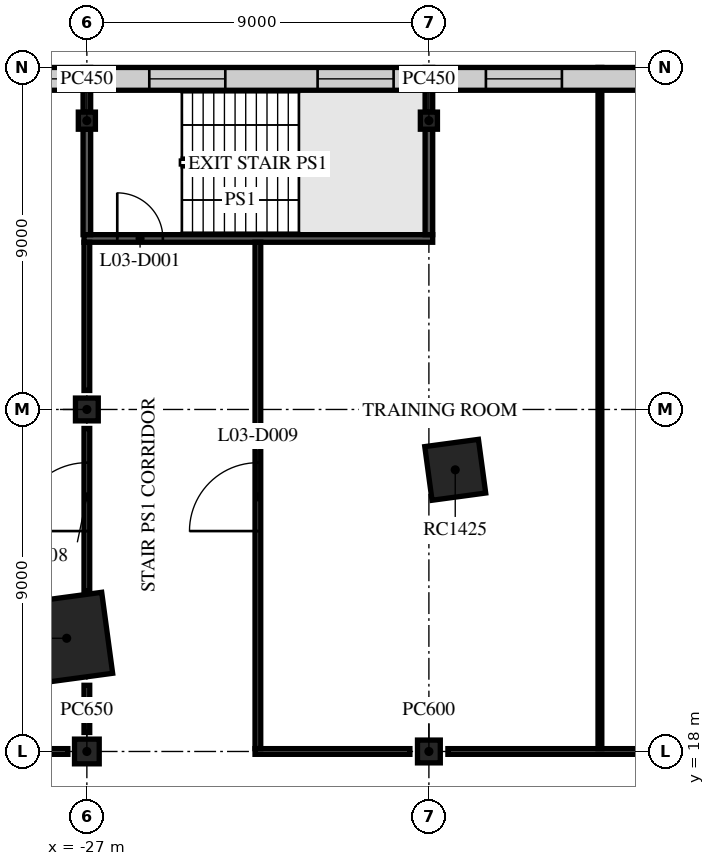
"""IFC4 building model, lengths in metres.
Left out: names, types, materials, properties, quantities, classifications, styles, units other than length and angle.
Written with IfcOpenShell. Run it as: python <this file> out.ifc"""

import sys

from ifc_helpers import new_model, si_unit, direction, frame, frame_2d, origin, origin_2d, place, context, subcontext, project, spatial, rectangle, extrude, element, fill, save


model = new_model("IFC4")
c1 = context("Model", 3, precision=1e-05, world=origin(), true_north=direction((0.0, 1.0)))
c2 = subcontext(c1, "Body", "Model", "MODEL_VIEW")
j1 = project(units=[si_unit("LENGTHUNIT", "METRE"), si_unit("PLANEANGLEUNIT", "RADIAN")], contexts=[c1])
p1 = place(None, origin())
s1 = spatial("IfcSite", under=j1, at=p1, CompositionType="ELEMENT")
p2 = place(p1, origin())
s2 = spatial("IfcBuilding", under=s1, at=p2, CompositionType="ELEMENT")
p3 = place(p2, frame((0.0, 0.0, 13.5)))
s3 = spatial("IfcBuildingStorey", under=s2, at=p3, CompositionType="ELEMENT", Elevation=13.5)
p4 = place(p3, frame((-27.0, 18.0, 0.0), z_axis=(0.0, 0.0, 1.0), x_axis=(1.0, 0.0, 0.0)))
e1 = element("IfcColumn", 1, at=p4, inside=s3, PredefinedType="COLUMN", context=c2, shape_type="SweptSolid", body=[
    extrude(rectangle(XDim=0.65, YDim=0.65, at=origin_2d()), origin(), (0.0, 0.0, 1.0), 4.5),
])
p5 = place(p3, frame((-27.0, 27.0, 0.0), z_axis=(0.0, 0.0, 1.0), x_axis=(1.0, 0.0, 0.0)))
e2 = element("IfcColumn", 2, at=p5, inside=s3, PredefinedType="COLUMN", context=c2, shape_type="SweptSolid", body=[
    extrude(rectangle(XDim=0.6, YDim=0.6, at=origin_2d()), origin(), (0.0, 0.0, 1.0), 4.5),
])
p6 = place(p3, frame((-27.0, 34.6, 0.0), z_axis=(0.0, 0.0, 1.0), x_axis=(1.0, 0.0, 0.0)))
e3 = element("IfcColumn", 3, at=p6, inside=s3, PredefinedType="COLUMN", context=c2, shape_type="SweptSolid", body=[
    extrude(rectangle(XDim=0.45, YDim=0.45, at=origin_2d()), origin(), (0.0, 0.0, 1.0), 4.5),
])
p7 = place(p3, frame((-18.0, 18.0, 0.0), z_axis=(0.0, 0.0, 1.0), x_axis=(1.0, 0.0, 0.0)))
e4 = element("IfcColumn", 4, at=p7, inside=s3, PredefinedType="COLUMN", context=c2, shape_type="SweptSolid", body=[
    extrude(rectangle(XDim=0.6, YDim=0.6, at=origin_2d()), origin(), (0.0, 0.0, 1.0), 4.5),
])
p8 = place(p3, frame((-18.0, 34.6, 0.0), z_axis=(0.0, 0.0, 1.0), x_axis=(1.0, 0.0, 0.0)))
e5 = element("IfcColumn", 5, at=p8, inside=s3, PredefinedType="COLUMN", context=c2, shape_type="SweptSolid", body=[
    extrude(rectangle(XDim=0.45, YDim=0.45, at=origin_2d()), origin(), (0.0, 0.0, 1.0), 4.5),
])
p9 = place(p3, frame((-17.307, 25.412, 0.0), z_axis=(0.0, 0.0, 1.0), x_axis=(0.991001197216, 0.133853005627, 0.0)))
e6 = element("IfcColumn", 6, at=p9, inside=s3, PredefinedType="COLUMN", context=c2, shape_type="SweptSolid", body=[
    extrude(rectangle(XDim=1.425, YDim=1.425, at=origin_2d()), origin(), (0.0, 0.0, 1.0), 4.5),
])
p10 = place(p3, frame((-27.531, 20.979, 0.0), z_axis=(0.0, 0.0, 1.0), x_axis=(0.991001197216, 0.133853005627, 0.0)))
e7 = element("IfcColumn", 7, at=p10, inside=s3, PredefinedType="COLUMN", context=c2, shape_type="SweptSolid", body=[
    extrude(rectangle(XDim=2.15, YDim=2.15, at=origin_2d()), origin(), (0.0, 0.0, 1.0), 4.5),
])
p11 = place(p3, frame((-34.1, 18.0, 0.0), z_axis=(0.0, 0.0, 1.0), x_axis=(1.0, 0.0, 0.0)))
e8 = element("IfcWall", 8, at=p11, inside=s3, PredefinedType="PARTITIONING", context=c2, shape_type="SweptSolid", body=[
    extrude(rectangle(XDim=6.6, YDim=0.15, at=frame_2d((3.3, 0.0))), origin(), (0.0, 0.0, 1.0), 4.1),
])
p12 = place(p3, frame((-22.575, 18.0, 0.0), z_axis=(0.0, 0.0, 1.0), x_axis=(1.0, 0.0, 0.0)))
e9 = element("IfcWall", 9, at=p12, inside=s3, PredefinedType="PARTITIONING", context=c2, shape_type="SweptSolid", body=[
    extrude(rectangle(XDim=4.075, YDim=0.15, at=frame_2d((2.038, 0.0))), origin(), (0.0, 0.0, 1.0), 4.1),
])
p13 = place(p3, frame((-17.5, 18.0, 0.0), z_axis=(0.0, 0.0, 1.0), x_axis=(1.0, 0.0, 0.0)))
e10 = element("IfcWall", 10, at=p13, inside=s3, PredefinedType="PARTITIONING", context=c2, shape_type="SweptSolid", body=[
    extrude(rectangle(XDim=8.0, YDim=0.15, at=frame_2d((4.0, 0.0))), origin(), (0.0, 0.0, 1.0), 4.1),
])
p14 = place(p3, frame((-27.075, 31.5, 0.0), z_axis=(0.0, 0.0, 1.0), x_axis=(1.0, 0.0, 0.0)))
e11 = element("IfcWall", 11, at=p14, inside=s3, PredefinedType="PARTITIONING", context=c2, shape_type="SweptSolid", body=[
    extrude(rectangle(XDim=9.175, YDim=0.2, at=frame_2d((4.587, 0.0))), origin(), (0.0, 0.0, 1.0), 4.1),
])
p15 = place(p14, frame((0.875, 0.0, 0.0)))
e12 = element("IfcOpeningElement", 12, at=p15, cuts=e11, PredefinedType="OPENING", context=c2, shape_type="SweptSolid", body=[
    extrude(rectangle(XDim=1.2, YDim=2.1, at=frame_2d((0.6, 1.05))), frame((0.0, 0.11, 0.0), z_axis=(0.0, -1.0, 0.0), x_axis=(1.0, 0.0, 0.0)), (0.0, 0.0, 1.0), 0.22),
])
p16 = place(p3, frame((-27.0, 18.5, 0.0), z_axis=(0.0, 0.0, 1.0), x_axis=(0.0, 1.0, 0.0)))
e13 = element("IfcWall", 13, at=p16, inside=s3, PredefinedType="PARTITIONING", context=c2, shape_type="SweptSolid", body=[
    extrude(rectangle(XDim=1.242, YDim=0.15, at=frame_2d((0.621, 0.0))), origin(), (0.0, 0.0, 1.0), 4.1),
])
p17 = place(p3, frame((-27.0, 22.216, 0.0), z_axis=(0.0, 0.0, 1.0), x_axis=(0.0, 1.0, 0.0)))
e14 = element("IfcWall", 14, at=p17, inside=s3, PredefinedType="PARTITIONING", context=c2, shape_type="SweptSolid", body=[
    extrude(rectangle(XDim=4.284, YDim=0.15, at=frame_2d((2.142, 0.0))), origin(), (0.0, 0.0, 1.0), 4.1),
])
p18 = place(p17, frame((1.584, 0.0, 0.0)))
e15 = element("IfcOpeningElement", 15, at=p18, cuts=e14, PredefinedType="OPENING", context=c2, shape_type="SweptSolid", body=[
    extrude(rectangle(XDim=1.8, YDim=2.1, at=frame_2d((0.9, 1.05))), frame((0.0, 0.085, 0.0), z_axis=(0.0, -1.0, 0.0), x_axis=(1.0, 0.0, 0.0)), (0.0, 0.0, 1.0), 0.17),
])
p19 = place(p3, frame((-27.0, 27.5, 0.0), z_axis=(0.0, 0.0, 1.0), x_axis=(0.0, 1.0, 0.0)))
e16 = element("IfcWall", 16, at=p19, inside=s3, PredefinedType="PARTITIONING", context=c2, shape_type="SweptSolid", body=[
    extrude(rectangle(XDim=3.9, YDim=0.15, at=frame_2d((1.95, 0.0))), origin(), (0.0, 0.0, 1.0), 4.1),
])
p20 = place(p3, frame((-27.0, 31.6, 0.0), z_axis=(0.0, 0.0, 1.0), x_axis=(0.0, 1.0, 0.0)))
e17 = element("IfcWall", 17, at=p20, inside=s3, PredefinedType="PARTITIONING", context=c2, shape_type="SweptSolid", body=[
    extrude(rectangle(XDim=2.775, YDim=0.2, at=frame_2d((1.387, 0.0))), origin(), (0.0, 0.0, 1.0), 4.1),
])
p21 = place(p3, frame((-27.0, 34.825, 0.0), z_axis=(0.0, 0.0, 1.0), x_axis=(0.0, 1.0, 0.0)))
e18 = element("IfcWall", 18, at=p21, inside=s3, PredefinedType="PARTITIONING", context=c2, shape_type="SweptSolid", body=[
    extrude(rectangle(XDim=1.175, YDim=0.2, at=frame_2d((0.587, 0.0))), origin(), (0.0, 0.0, 1.0), 4.1),
])
p22 = place(p3, frame((-22.5, 18.075, 0.0), z_axis=(0.0, 0.0, 1.0), x_axis=(0.0, 1.0, 0.0)))
e19 = element("IfcWall", 19, at=p22, inside=s3, PredefinedType="PARTITIONING", context=c2, shape_type="SweptSolid", body=[
    extrude(rectangle(XDim=13.325, YDim=0.15, at=frame_2d((6.663, 0.0))), origin(), (0.0, 0.0, 1.0), 4.1),
])
p23 = place(p22, frame((5.725, 0.0, 0.0)))
e20 = element("IfcOpeningElement", 20, at=p23, cuts=e19, PredefinedType="OPENING", context=c2, shape_type="SweptSolid", body=[
    extrude(rectangle(XDim=1.8, YDim=2.1, at=frame_2d((0.9, 1.05))), frame((0.0, 0.085, 0.0), z_axis=(0.0, -1.0, 0.0), x_axis=(1.0, 0.0, 0.0)), (0.0, 0.0, 1.0), 0.17),
])
p24 = place(p3, frame((-18.0, 31.6, 0.0), z_axis=(0.0, 0.0, 1.0), x_axis=(0.0, 1.0, 0.0)))
e21 = element("IfcWall", 21, at=p24, inside=s3, PredefinedType="PARTITIONING", context=c2, shape_type="SweptSolid", body=[
    extrude(rectangle(XDim=2.775, YDim=0.2, at=frame_2d((1.387, 0.0))), origin(), (0.0, 0.0, 1.0), 4.1),
])
p25 = place(p3, frame((-18.0, 34.825, 0.0), z_axis=(0.0, 0.0, 1.0), x_axis=(0.0, 1.0, 0.0)))
e22 = element("IfcWall", 22, at=p25, inside=s3, PredefinedType="PARTITIONING", context=c2, shape_type="SweptSolid", body=[
    extrude(rectangle(XDim=1.175, YDim=0.2, at=frame_2d((0.587, 0.0))), origin(), (0.0, 0.0, 1.0), 4.1),
])
p26 = place(p3, frame((-13.5, 18.075, 0.0), z_axis=(0.0, 0.0, 1.0), x_axis=(0.0, 1.0, 0.0)))
e23 = element("IfcWall", 23, at=p26, inside=s3, PredefinedType="PARTITIONING", context=c2, shape_type="SweptSolid", body=[
    extrude(rectangle(XDim=17.925, YDim=0.1, at=frame_2d((8.962, 0.0))), origin(), (0.0, 0.0, 1.0), 4.1),
])
p27 = place(p3, frame((30.876, 35.7, 0.0), z_axis=(0.0, 0.0, 1.0), x_axis=(-1.0, 0.0, 0.0)))
e24 = element("IfcWall", 24, at=p27, inside=s3, PredefinedType="STANDARD", context=c2, shape_type="SweptSolid", body=[
    extrude(rectangle(XDim=61.751, YDim=0.6, at=frame_2d((30.876, 0.0))), origin(), (0.0, 0.0, 1.0), 4.1),
])
p28 = place(p27, frame((1.152, 0.0, 0.9)))
e25 = element("IfcOpeningElement", 25, at=p28, cuts=e24, PredefinedType="OPENING", context=c2, shape_type="SweptSolid", body=[
    extrude(rectangle(XDim=2.0, YDim=3.0, at=frame_2d((1.0, 1.5))), frame((0.0, 0.31, 0.0), z_axis=(0.0, -1.0, 0.0), x_axis=(1.0, 0.0, 0.0)), (0.0, 0.0, 1.0), 0.62),
])
p29 = place(p27, frame((5.519, 0.0, 0.9)))
e26 = element("IfcOpeningElement", 26, at=p29, cuts=e24, PredefinedType="OPENING", context=c2, shape_type="SweptSolid", body=[
    extrude(rectangle(XDim=2.0, YDim=3.0, at=frame_2d((1.0, 1.5))), frame((0.0, 0.31, 0.0), z_axis=(0.0, -1.0, 0.0), x_axis=(1.0, 0.0, 0.0)), (0.0, 0.0, 1.0), 0.62),
])
p30 = place(p27, frame((9.947, 0.0, 0.9)))
e27 = element("IfcOpeningElement", 27, at=p30, cuts=e24, PredefinedType="OPENING", context=c2, shape_type="SweptSolid", body=[
    extrude(rectangle(XDim=2.0, YDim=3.0, at=frame_2d((1.0, 1.5))), frame((0.0, 0.31, 0.0), z_axis=(0.0, -1.0, 0.0), x_axis=(1.0, 0.0, 0.0)), (0.0, 0.0, 1.0), 0.62),
])
p31 = place(p27, frame((14.376, 0.0, 0.9)))
e28 = element("IfcOpeningElement", 28, at=p31, cuts=e24, PredefinedType="OPENING", context=c2, shape_type="SweptSolid", body=[
    extrude(rectangle(XDim=2.0, YDim=3.0, at=frame_2d((1.0, 1.5))), frame((0.0, 0.31, 0.0), z_axis=(0.0, -1.0, 0.0), x_axis=(1.0, 0.0, 0.0)), (0.0, 0.0, 1.0), 0.62),
])
p32 = place(p27, frame((18.804, 0.0, 0.9)))
e29 = element("IfcOpeningElement", 29, at=p32, cuts=e24, PredefinedType="OPENING", context=c2, shape_type="SweptSolid", body=[
    extrude(rectangle(XDim=2.0, YDim=3.0, at=frame_2d((1.0, 1.5))), frame((0.0, 0.31, 0.0), z_axis=(0.0, -1.0, 0.0), x_axis=(1.0, 0.0, 0.0)), (0.0, 0.0, 1.0), 0.62),
])
p33 = place(p27, frame((23.233, 0.0, 0.9)))
e30 = element("IfcOpeningElement", 30, at=p33, cuts=e24, PredefinedType="OPENING", context=c2, shape_type="SweptSolid", body=[
    extrude(rectangle(XDim=2.0, YDim=3.0, at=frame_2d((1.0, 1.5))), frame((0.0, 0.31, 0.0), z_axis=(0.0, -1.0, 0.0), x_axis=(1.0, 0.0, 0.0)), (0.0, 0.0, 1.0), 0.62),
])
p34 = place(p27, frame((27.662, 0.0, 0.9)))
e31 = element("IfcOpeningElement", 31, at=p34, cuts=e24, PredefinedType="OPENING", context=c2, shape_type="SweptSolid", body=[
    extrude(rectangle(XDim=2.0, YDim=3.0, at=frame_2d((1.0, 1.5))), frame((0.0, 0.31, 0.0), z_axis=(0.0, -1.0, 0.0), x_axis=(1.0, 0.0, 0.0)), (0.0, 0.0, 1.0), 0.62),
])
p35 = place(p27, frame((32.09, 0.0, 0.9)))
e32 = element("IfcOpeningElement", 32, at=p35, cuts=e24, PredefinedType="OPENING", context=c2, shape_type="SweptSolid", body=[
    extrude(rectangle(XDim=2.0, YDim=3.0, at=frame_2d((1.0, 1.5))), frame((0.0, 0.31, 0.0), z_axis=(0.0, -1.0, 0.0), x_axis=(1.0, 0.0, 0.0)), (0.0, 0.0, 1.0), 0.62),
])
p36 = place(p27, frame((36.519, 0.0, 0.9)))
e33 = element("IfcOpeningElement", 33, at=p36, cuts=e24, PredefinedType="OPENING", context=c2, shape_type="SweptSolid", body=[
    extrude(rectangle(XDim=2.0, YDim=3.0, at=frame_2d((1.0, 1.5))), frame((0.0, 0.31, 0.0), z_axis=(0.0, -1.0, 0.0), x_axis=(1.0, 0.0, 0.0)), (0.0, 0.0, 1.0), 0.62),
])
p37 = place(p27, frame((40.947, 0.0, 0.9)))
e34 = element("IfcOpeningElement", 34, at=p37, cuts=e24, PredefinedType="OPENING", context=c2, shape_type="SweptSolid", body=[
    extrude(rectangle(XDim=2.0, YDim=3.0, at=frame_2d((1.0, 1.5))), frame((0.0, 0.31, 0.0), z_axis=(0.0, -1.0, 0.0), x_axis=(1.0, 0.0, 0.0)), (0.0, 0.0, 1.0), 0.62),
])
p38 = place(p27, frame((45.376, 0.0, 0.9)))
e35 = element("IfcOpeningElement", 35, at=p38, cuts=e24, PredefinedType="OPENING", context=c2, shape_type="SweptSolid", body=[
    extrude(rectangle(XDim=2.0, YDim=3.0, at=frame_2d((1.0, 1.5))), frame((0.0, 0.31, 0.0), z_axis=(0.0, -1.0, 0.0), x_axis=(1.0, 0.0, 0.0)), (0.0, 0.0, 1.0), 0.62),
])
p39 = place(p27, frame((49.804, 0.0, 0.9)))
e36 = element("IfcOpeningElement", 36, at=p39, cuts=e24, PredefinedType="OPENING", context=c2, shape_type="SweptSolid", body=[
    extrude(rectangle(XDim=2.0, YDim=3.0, at=frame_2d((1.0, 1.5))), frame((0.0, 0.31, 0.0), z_axis=(0.0, -1.0, 0.0), x_axis=(1.0, 0.0, 0.0)), (0.0, 0.0, 1.0), 0.62),
])
p40 = place(p27, frame((54.233, 0.0, 0.9)))
e37 = element("IfcOpeningElement", 37, at=p40, cuts=e24, PredefinedType="OPENING", context=c2, shape_type="SweptSolid", body=[
    extrude(rectangle(XDim=2.0, YDim=3.0, at=frame_2d((1.0, 1.5))), frame((0.0, 0.31, 0.0), z_axis=(0.0, -1.0, 0.0), x_axis=(1.0, 0.0, 0.0)), (0.0, 0.0, 1.0), 0.62),
])
p41 = place(p27, frame((58.599, 0.0, 0.9)))
e38 = element("IfcOpeningElement", 38, at=p41, cuts=e24, PredefinedType="OPENING", context=c2, shape_type="SweptSolid", body=[
    extrude(rectangle(XDim=2.0, YDim=3.0, at=frame_2d((1.0, 1.5))), frame((0.0, 0.31, 0.0), z_axis=(0.0, -1.0, 0.0), x_axis=(1.0, 0.0, 0.0)), (0.0, 0.0, 1.0), 0.62),
])
p42 = place(p15, origin())
e39 = element("IfcDoor", 39, at=p42, inside=s3, OperationType="SINGLE_SWING_LEFT", PredefinedType="DOOR", context=c2, shape_type="SweptSolid", body=[
    extrude(rectangle(XDim=1.2, YDim=2.1, at=frame_2d((0.6, 1.05))), frame((0.0, 0.025, 0.0), z_axis=(0.0, -1.0, 0.0), x_axis=(1.0, 0.0, 0.0)), (0.0, 0.0, 1.0), 0.05),
])
fill(e12, e39)
p43 = place(p18, origin())
e40 = element("IfcDoor", 40, at=p43, inside=s3, OperationType="DOUBLE_DOOR_SINGLE_SWING", PredefinedType="DOOR", context=c2, shape_type="SweptSolid", body=[
    extrude(rectangle(XDim=1.8, YDim=2.1, at=frame_2d((0.9, 1.05))), frame((0.0, 0.025, 0.0), z_axis=(0.0, -1.0, 0.0), x_axis=(1.0, 0.0, 0.0)), (0.0, 0.0, 1.0), 0.05),
])
fill(e15, e40)
p44 = place(p23, origin())
e41 = element("IfcDoor", 41, at=p44, inside=s3, OperationType="DOUBLE_DOOR_SINGLE_SWING", PredefinedType="DOOR", context=c2, shape_type="SweptSolid", body=[
    extrude(rectangle(XDim=1.8, YDim=2.1, at=frame_2d((0.9, 1.05))), frame((0.0, 0.025, 0.0), z_axis=(0.0, -1.0, 0.0), x_axis=(1.0, 0.0, 0.0)), (0.0, 0.0, 1.0), 0.05),
])
fill(e20, e41)
p45 = place(p38, origin())
e42 = element("IfcWindow", 42, at=p45, inside=s3, PartitioningType="SINGLE_PANEL", PredefinedType="WINDOW", context=c2, shape_type="SweptSolid", body=[
    extrude(rectangle(XDim=2.0, YDim=3.0, at=frame_2d((1.0, 1.5))), frame((0.0, 0.03, 0.0), z_axis=(0.0, -1.0, 0.0), x_axis=(1.0, 0.0, 0.0)), (0.0, 0.0, 1.0), 0.06),
])
fill(e35, e42)
p46 = place(p39, origin())
e43 = element("IfcWindow", 43, at=p46, inside=s3, PartitioningType="SINGLE_PANEL", PredefinedType="WINDOW", context=c2, shape_type="SweptSolid", body=[
    extrude(rectangle(XDim=2.0, YDim=3.0, at=frame_2d((1.0, 1.5))), frame((0.0, 0.03, 0.0), z_axis=(0.0, -1.0, 0.0), x_axis=(1.0, 0.0, 0.0)), (0.0, 0.0, 1.0), 0.06),
])
fill(e36, e43)
p47 = place(p40, origin())
e44 = element("IfcWindow", 44, at=p47, inside=s3, PartitioningType="SINGLE_PANEL", PredefinedType="WINDOW", context=c2, shape_type="SweptSolid", body=[
    extrude(rectangle(XDim=2.0, YDim=3.0, at=frame_2d((1.0, 1.5))), frame((0.0, 0.03, 0.0), z_axis=(0.0, -1.0, 0.0), x_axis=(1.0, 0.0, 0.0)), (0.0, 0.0, 1.0), 0.06),
])
fill(e37, e44)
p48 = place(p41, origin())
e45 = element("IfcWindow", 45, at=p48, inside=s3, PartitioningType="SINGLE_PANEL", PredefinedType="WINDOW", context=c2, shape_type="SweptSolid", body=[
    extrude(rectangle(XDim=2.0, YDim=3.0, at=frame_2d((1.0, 1.5))), frame((0.0, 0.03, 0.0), z_axis=(0.0, -1.0, 0.0), x_axis=(1.0, 0.0, 0.0)), (0.0, 0.0, 1.0), 0.06),
])
fill(e38, e45)
save(model, sys.argv[1])
